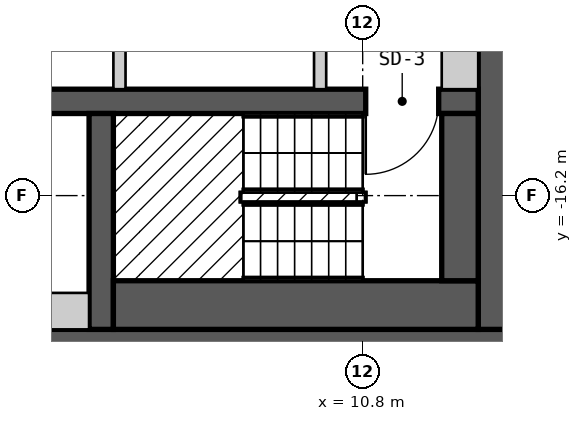
"""IFC4 building model, lengths in metres.
Left out: names, types, materials, properties, quantities, classifications, styles, units other than length and angle.
Written with IfcOpenShell. Run it as: python <this file> out.ifc"""

import sys

from ifc_helpers import new_model, si_unit, direction, frame, frame_2d, origin, place, context, subcontext, project, spatial, rectangle, extrude, element, fill, save


model = new_model("IFC4")
c1 = context("Model", 3, precision=1e-05, world=origin(), true_north=direction((0.0, 1.0)))
c2 = subcontext(c1, "Body", "Model", "MODEL_VIEW")
j1 = project(units=[si_unit("LENGTHUNIT", "METRE"), si_unit("PLANEANGLEUNIT", "RADIAN")], contexts=[c1])
p1 = place(None, origin())
s1 = spatial("IfcSite", under=j1, at=p1, CompositionType="ELEMENT")
p2 = place(p1, origin())
s2 = spatial("IfcBuilding", under=s1, at=p2, CompositionType="ELEMENT")
p3 = place(p2, frame((0.0, 0.0, 157.2)))
s3 = spatial("IfcBuildingStorey", under=s2, at=p3, CompositionType="ELEMENT", Elevation=157.2)
p4 = place(p3, frame((-13.3, -18.7, 0.0), z_axis=(0.0, 0.0, 1.0), x_axis=(1.0, 0.0, 0.0)))
e1 = element("IfcWall", 1, at=p4, inside=s3, PredefinedType="SHEAR", context=c2, shape_type="SweptSolid", body=[
    extrude(rectangle(XDim=26.6, YDim=0.6, at=frame_2d((13.3, 0.0))), origin(), (0.0, 0.0, 1.0), 5.7),
])
p5 = place(p3, frame((13.0, -18.4, 0.0), z_axis=(0.0, 0.0, 1.0), x_axis=(0.0, 1.0, 0.0)))
e2 = element("IfcWall", 2, at=p5, inside=s3, PredefinedType="SHEAR", context=c2, shape_type="SweptSolid", body=[
    extrude(rectangle(XDim=12.8, YDim=0.6, at=frame_2d((6.4, 0.0))), origin(), (0.0, 0.0, 1.0), 5.7),
])
p6 = place(p3, frame((-12.7, -14.65, 0.0), z_axis=(0.0, 0.0, 1.0), x_axis=(1.0, 0.0, 0.0)))
e3 = element("IfcWall", 3, at=p6, inside=s3, PredefinedType="SHEAR", context=c2, shape_type="SweptSolid", body=[
    extrude(rectangle(XDim=25.4, YDim=0.4, at=frame_2d((12.7, 0.0))), origin(), (0.0, 0.0, 1.0), 5.7),
])
p7 = place(p6, frame((1.9, 0.0, 0.0), z_axis=(0.0, 0.0, 1.0), x_axis=(-1.0, 0.0, 0.0)))
e4 = element("IfcOpeningElement", 4, at=p7, cuts=e3, PredefinedType="OPENING", context=c2, shape_type="SweptSolid", body=[
    extrude(rectangle(XDim=1.2, YDim=2.1, at=frame_2d((0.6, 1.05))), frame((0.0, 0.21, 0.0), z_axis=(0.0, -1.0, 0.0), x_axis=(1.0, 0.0, 0.0)), (0.0, 0.0, 1.0), 0.42),
])
p8 = place(p6, frame((24.75, 0.0, 0.0), z_axis=(0.0, 0.0, 1.0), x_axis=(-1.0, 0.0, 0.0)))
e5 = element("IfcOpeningElement", 5, at=p8, cuts=e3, PredefinedType="OPENING", context=c2, shape_type="SweptSolid", body=[
    extrude(rectangle(XDim=1.2, YDim=2.1, at=frame_2d((0.6, 1.05))), frame((0.0, 0.21, 0.0), z_axis=(0.0, -1.0, 0.0), x_axis=(1.0, 0.0, 0.0)), (0.0, 0.0, 1.0), 0.42),
])
p9 = place(p6, frame((8.6, 0.0, 0.0), z_axis=(0.0, 0.0, 1.0), x_axis=(-1.0, 0.0, 0.0)))
e6 = element("IfcOpeningElement", 6, at=p9, cuts=e3, PredefinedType="OPENING", context=c2, shape_type="SweptSolid", body=[
    extrude(rectangle(XDim=1.0, YDim=2.1, at=frame_2d((0.5, 1.05))), frame((0.0, 0.21, 0.0), z_axis=(0.0, -1.0, 0.0), x_axis=(1.0, 0.0, 0.0)), (0.0, 0.0, 1.0), 0.42),
])
p10 = place(p6, frame((11.35, 0.0, 0.0), z_axis=(0.0, 0.0, 1.0), x_axis=(-1.0, 0.0, 0.0)))
e7 = element("IfcOpeningElement", 7, at=p10, cuts=e3, PredefinedType="OPENING", context=c2, shape_type="SweptSolid", body=[
    extrude(rectangle(XDim=0.9, YDim=2.1, at=frame_2d((0.45, 1.05))), frame((0.0, 0.21, 0.0), z_axis=(0.0, -1.0, 0.0), x_axis=(1.0, 0.0, 0.0)), (0.0, 0.0, 1.0), 0.42),
])
p11 = place(p6, frame((14.15, 0.0, 0.0), z_axis=(0.0, 0.0, 1.0), x_axis=(-1.0, 0.0, 0.0)))
e8 = element("IfcOpeningElement", 8, at=p11, cuts=e3, PredefinedType="OPENING", context=c2, shape_type="SweptSolid", body=[
    extrude(rectangle(XDim=1.0, YDim=2.1, at=frame_2d((0.5, 1.05))), frame((0.0, 0.21, 0.0), z_axis=(0.0, -1.0, 0.0), x_axis=(1.0, 0.0, 0.0)), (0.0, 0.0, 1.0), 0.42),
])
p12 = place(p6, frame((17.75, 0.0, 0.0), z_axis=(0.0, 0.0, 1.0), x_axis=(-1.0, 0.0, 0.0)))
e9 = element("IfcOpeningElement", 9, at=p12, cuts=e3, PredefinedType="OPENING", context=c2, shape_type="SweptSolid", body=[
    extrude(rectangle(XDim=1.0, YDim=2.1, at=frame_2d((0.5, 1.05))), frame((0.0, 0.21, 0.0), z_axis=(0.0, -1.0, 0.0), x_axis=(1.0, 0.0, 0.0)), (0.0, 0.0, 1.0), 0.42),
])
p13 = place(p3, frame((6.5, -18.4, 0.0), z_axis=(0.0, 0.0, 1.0), x_axis=(0.0, 1.0, 0.0)))
e10 = element("IfcWall", 10, at=p13, inside=s3, PredefinedType="SHEAR", context=c2, shape_type="SweptSolid", body=[
    extrude(rectangle(XDim=3.55, YDim=0.4, at=frame_2d((1.775, 0.0))), origin(), (0.0, 0.0, 1.0), 5.7),
])
p14 = place(p3, frame((-6.3, -18.1, 0.0), z_axis=(0.0, 0.0, 1.0), x_axis=(1.0, 0.0, 0.0)))
e11 = element("IfcWall", 11, at=p14, inside=s3, PredefinedType="PARTITIONING", context=c2, shape_type="SweptSolid", body=[
    extrude(rectangle(XDim=12.6, YDim=0.6, at=frame_2d((6.3, 0.0))), origin(), (0.0, 0.0, 1.0), 5.7),
])
p15 = place(p3, frame((6.7, -18.0, 0.0), z_axis=(0.0, 0.0, 1.0), x_axis=(1.0, 0.0, 0.0)))
e12 = element("IfcWall", 12, at=p15, inside=s3, PredefinedType="SOLIDWALL", context=c2, shape_type="SweptSolid", body=[
    extrude(rectangle(XDim=6.0, YDim=0.8, at=frame_2d((3.0, 0.0))), origin(), (0.0, 0.0, 1.0), 5.7),
])
p16 = place(p3, frame((6.8, -14.45, 0.0), z_axis=(0.0, 0.0, 1.0), x_axis=(0.0, 1.0, 0.0)))
e13 = element("IfcWall", 13, at=p16, inside=s3, PredefinedType="PARTITIONING", context=c2, shape_type="SweptSolid", body=[
    extrude(rectangle(XDim=2.0, YDim=0.2, at=frame_2d((1.0, 0.0))), origin(), (0.0, 0.0, 1.0), 5.7),
])
p17 = place(p3, frame((10.1, -14.45, 0.0), z_axis=(0.0, 0.0, 1.0), x_axis=(0.0, 1.0, 0.0)))
e14 = element("IfcWall", 14, at=p17, inside=s3, PredefinedType="PARTITIONING", context=c2, shape_type="SweptSolid", body=[
    extrude(rectangle(XDim=1.8, YDim=0.2, at=frame_2d((0.9, 0.0))), origin(), (0.0, 0.0, 1.0), 5.7),
])
p18 = place(p3, frame((12.4, -17.6, 0.0), z_axis=(0.0, 0.0, 1.0), x_axis=(0.0, 1.0, 0.0)))
e15 = element("IfcWall", 15, at=p18, inside=s3, PredefinedType="SOLIDWALL", context=c2, shape_type="SweptSolid", body=[
    extrude(rectangle(XDim=2.75, YDim=0.6, at=frame_2d((1.375, 0.0))), origin(), (0.0, 0.0, 1.0), 5.7),
])
p19 = place(p3, frame((12.4, -14.45, 0.0), z_axis=(0.0, 0.0, 1.0), x_axis=(0.0, 1.0, 0.0)))
e16 = element("IfcWall", 16, at=p19, inside=s3, PredefinedType="PARTITIONING", context=c2, shape_type="SweptSolid", body=[
    extrude(rectangle(XDim=8.25, YDim=0.6, at=frame_2d((4.125, 0.0))), origin(), (0.0, 0.0, 1.0), 5.7),
])
p20 = place(p8, origin())
e17 = element("IfcDoor", 17, at=p20, inside=s3, OperationType="SINGLE_SWING_RIGHT", PredefinedType="DOOR", context=c2, shape_type="SweptSolid", body=[
    extrude(rectangle(XDim=1.2, YDim=2.1, at=frame_2d((0.6, 1.05))), frame((0.0, 0.025, 0.0), z_axis=(0.0, -1.0, 0.0), x_axis=(1.0, 0.0, 0.0)), (0.0, 0.0, 1.0), 0.05),
])
fill(e5, e17)
save(model, sys.argv[1])
